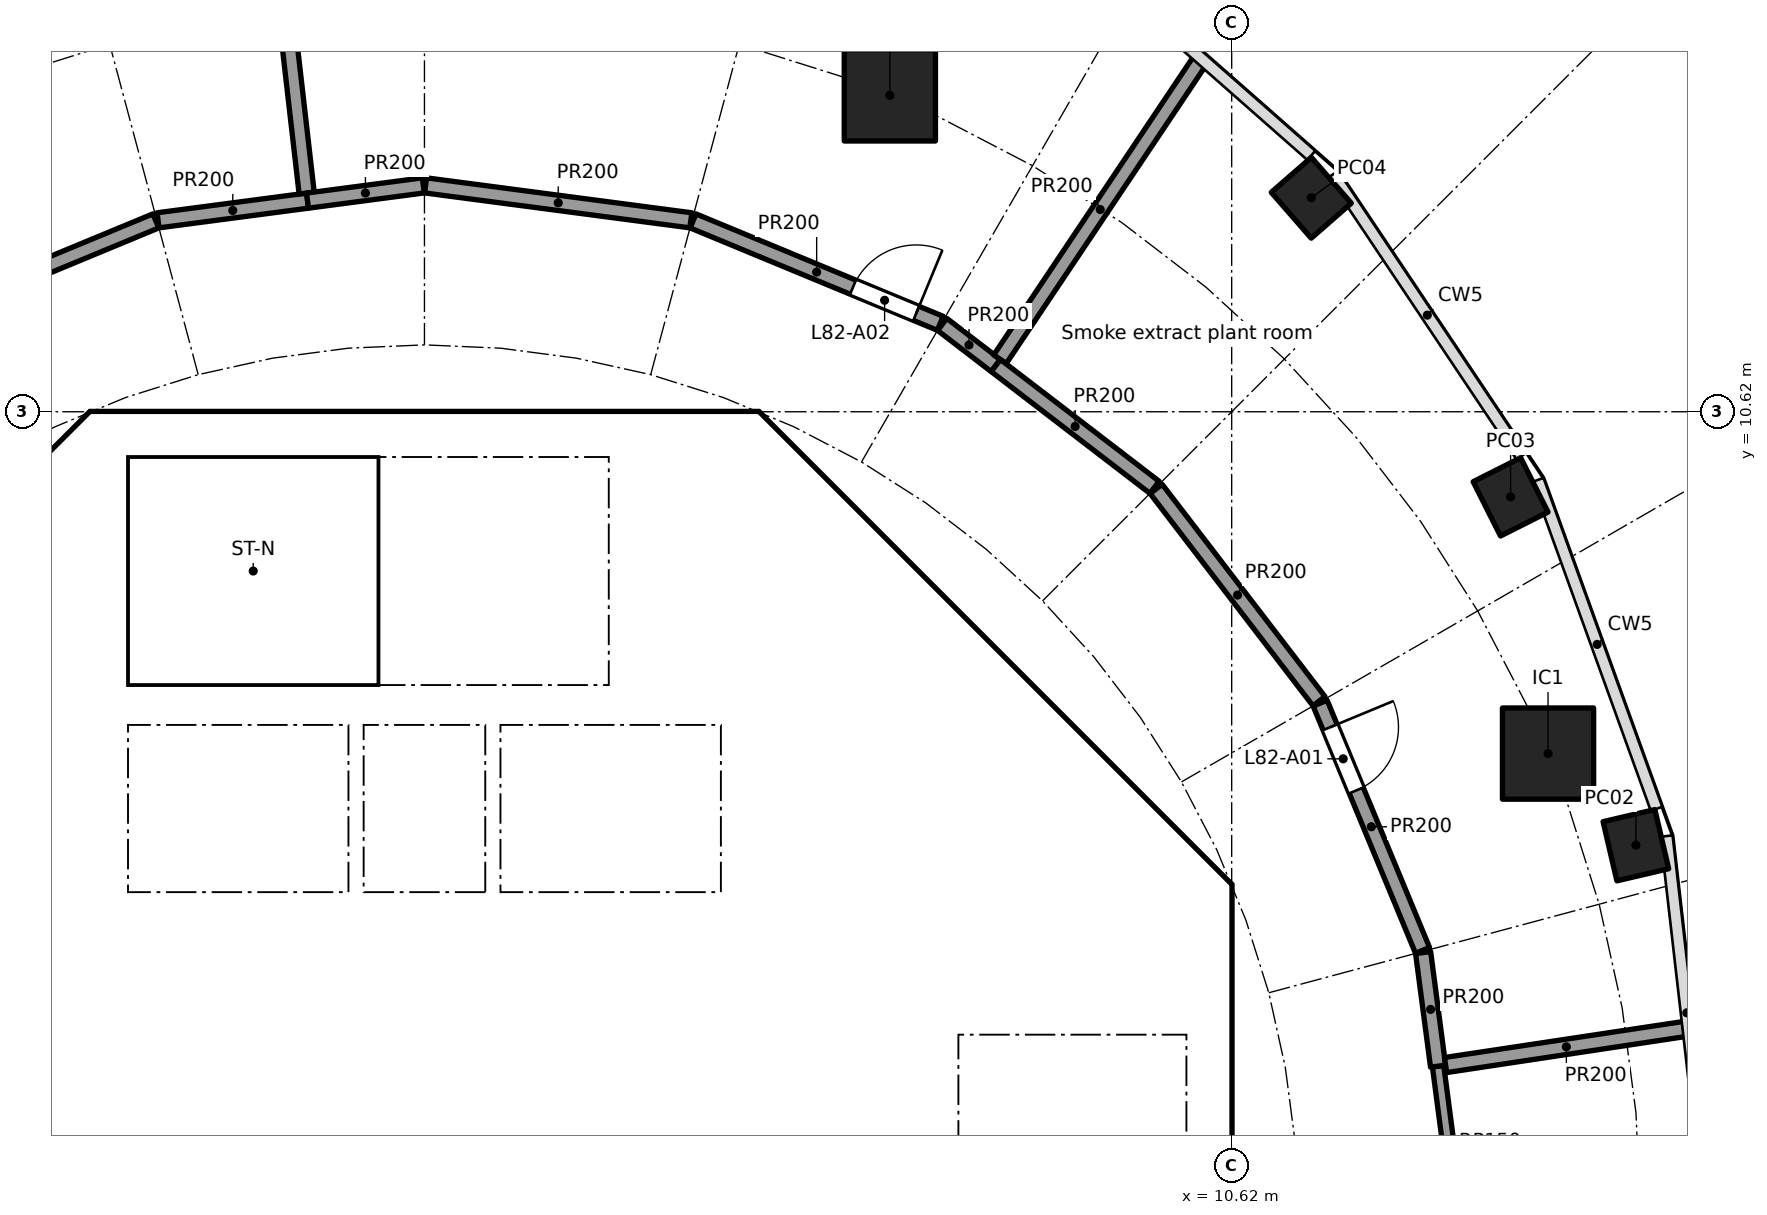
"""IFC4 building model, lengths in metres.
Left out: names, types, materials, properties, quantities, classifications, styles, units other than length and angle.
Written with IfcOpenShell. Run it as: python <this file> out.ifc"""

import sys

from ifc_helpers import new_model, si_unit, direction, frame, frame_2d, origin, origin_2d, place, context, subcontext, project, spatial, polyline, rectangle, hollow_rectangle, outline, extrude, element, fill, save


model = new_model("IFC4")
c1 = context("Model", 3, precision=1e-05, world=origin(), true_north=direction((0.0, 1.0)))
c2 = subcontext(c1, "Body", "Model", "MODEL_VIEW")
j1 = project(units=[si_unit("LENGTHUNIT", "METRE"), si_unit("PLANEANGLEUNIT", "RADIAN")], contexts=[c1])
p1 = place(None, origin())
s1 = spatial("IfcSite", under=j1, at=p1, CompositionType="ELEMENT")
p2 = place(p1, origin())
s2 = spatial("IfcBuilding", under=s1, at=p2, CompositionType="ELEMENT")
p3 = place(p2, frame((0.0, 0.0, 332.9)))
s3 = spatial("IfcBuildingStorey", under=s2, at=p3, CompositionType="ELEMENT", Elevation=332.9)
for number, where, z_axis, x_axis in (
    (1, (15.938, 4.917, 0.0), (0.0, 0.0, 1.0), (-0.227, 0.974, 0.0)),
    (2, (14.289, 9.5, 0.0), (0.0, 0.0, 1.0), (-0.45, 0.893, 0.0)),
    (3, (11.667, 13.435, 0.0), (0.0, 0.0, 1.0), (-0.657, 0.754, 0.0)),
):
    element("IfcColumn", number, at=place(p3, frame(where, z_axis=z_axis, x_axis=x_axis)), inside=s3, PredefinedType="COLUMN", context=c2, shape_type="SweptSolid", body=[
        extrude(hollow_rectangle(XDim=0.8, YDim=0.7, WallThickness=0.025, at=origin_2d()), origin(), (0.0, 0.0, 1.0), 4.0),
    ])
for number, where, z_axis, x_axis in (
    (4, (14.782, 6.123, 0.0), (0.0, 0.0, 1.0), (1.0, 0.0, 0.0)),
    (5, (6.123, 14.782, 0.0), (0.0, 0.0, 1.0), (1.0, 0.0, 0.0)),
):
    element("IfcColumn", number, at=place(p3, frame(where, z_axis=z_axis, x_axis=x_axis)), inside=s3, PredefinedType="COLUMN", context=c2, shape_type="SweptSolid", body=[
        extrude(rectangle(XDim=1.2, YDim=1.2, at=origin_2d()), origin(), (0.0, 0.0, 1.0), 4.0),
    ])
p4 = place(p3, frame((9.988, 4.613, 0.0), z_axis=(0.0, 0.0, 1.0), x_axis=(-0.707106781187, 0.707106781187, 0.0)))
e6 = element("IfcWall", 6, at=p4, inside=s3, PredefinedType="SHEAR", context=c2, shape_type="SweptSolid", body=[
    extrude(rectangle(XDim=7.602, YDim=0.6, at=frame_2d((3.801, 0.0))), origin(), (0.0, 0.0, 1.0), 3.7),
])
p5 = place(p4, frame((3.201, 0.0, 0.0)))
e7 = element("IfcOpeningElement", 7, at=p5, cuts=e6, PredefinedType="OPENING", context=c2, shape_type="SweptSolid", body=[
    extrude(rectangle(XDim=1.2, YDim=2.1, at=frame_2d((0.6, 1.05))), frame((0.0, 0.31, 0.0), z_axis=(0.0, -1.0, 0.0), x_axis=(1.0, 0.0, 0.0)), (0.0, 0.0, 1.0), 0.62),
])
p6 = place(p3, frame((-4.613, 9.988, 0.0), z_axis=(0.0, 0.0, 1.0), x_axis=(-0.707106781187, -0.707106781187, 0.0)))
e8 = element("IfcWall", 8, at=p6, inside=s3, PredefinedType="SHEAR", context=c2, shape_type="SweptSolid", body=[
    extrude(rectangle(XDim=7.602, YDim=0.6, at=frame_2d((3.801, 0.0))), origin(), (0.0, 0.0, 1.0), 3.7),
])
p7 = place(p6, frame((0.351, 0.0, 0.0)))
e9 = element("IfcOpeningElement", 9, at=p7, cuts=e8, PredefinedType="OPENING", context=c2, shape_type="SweptSolid", body=[
    extrude(rectangle(XDim=1.1, YDim=2.1, at=frame_2d((0.55, 1.05))), frame((0.0, 0.31, 0.0), z_axis=(0.0, -1.0, 0.0), x_axis=(1.0, 0.0, 0.0)), (0.0, 0.0, 1.0), 0.62),
])
p8 = place(p3, frame((4.0, 4.3, 0.0), z_axis=(0.0, 0.0, 1.0), x_axis=(0.0, 1.0, 0.0)))
e10 = element("IfcWall", 10, at=p8, inside=s3, PredefinedType="SOLIDWALL", context=c2, shape_type="SweptSolid", body=[
    extrude(rectangle(XDim=2.2, YDim=0.2, at=frame_2d((1.1, 0.0))), origin(), (0.0, 0.0, 1.0), 3.7),
])
p9 = place(p8, frame((0.55, 0.0, 0.0)))
e11 = element("IfcOpeningElement", 11, at=p9, cuts=e10, PredefinedType="OPENING", context=c2, shape_type="SweptSolid", body=[
    extrude(rectangle(XDim=1.1, YDim=2.1, at=frame_2d((0.55, 1.05))), frame((0.0, 0.11, 0.0), z_axis=(0.0, -1.0, 0.0), x_axis=(1.0, 0.0, 0.0)), (0.0, 0.0, 1.0), 0.22),
])
p10 = place(p3, frame((-4.0, 4.3, 0.0), z_axis=(0.0, 0.0, 1.0), x_axis=(0.0, 1.0, 0.0)))
e12 = element("IfcWall", 12, at=p10, inside=s3, PredefinedType="SOLIDWALL", context=c2, shape_type="SweptSolid", body=[
    extrude(rectangle(XDim=2.2, YDim=0.2, at=frame_2d((1.1, 0.0))), origin(), (0.0, 0.0, 1.0), 3.7),
])
p11 = place(p10, frame((0.55, 0.0, 0.0)))
e13 = element("IfcOpeningElement", 13, at=p11, cuts=e12, PredefinedType="OPENING", context=c2, shape_type="SweptSolid", body=[
    extrude(rectangle(XDim=1.1, YDim=2.1, at=frame_2d((0.55, 1.05))), frame((0.0, 0.11, 0.0), z_axis=(0.0, -1.0, 0.0), x_axis=(1.0, 0.0, 0.0)), (0.0, 0.0, 1.0), 0.22),
])
p12 = place(p3, frame((-6.7, 2.0, 0.0), z_axis=(0.0, 0.0, 1.0), x_axis=(1.0, 0.0, 0.0)))
e14 = element("IfcWall", 14, at=p12, inside=s3, PredefinedType="SOLIDWALL", context=c2, shape_type="SweptSolid", body=[
    extrude(rectangle(XDim=13.4, YDim=0.2, at=frame_2d((6.7, 0.0))), origin(), (0.0, 0.0, 1.0), 3.7),
])
p13 = place(p12, frame((2.95, 0.0, 0.0)))
e15 = element("IfcOpeningElement", 15, at=p13, cuts=e14, PredefinedType="OPENING", context=c2, shape_type="SweptSolid", body=[
    extrude(rectangle(XDim=0.9, YDim=2.1, at=frame_2d((0.45, 1.05))), frame((0.0, 0.11, 0.0), z_axis=(0.0, -1.0, 0.0), x_axis=(1.0, 0.0, 0.0)), (0.0, 0.0, 1.0), 0.22),
])
p14 = place(p12, frame((8.45, 0.0, 0.0)))
e16 = element("IfcOpeningElement", 16, at=p14, cuts=e14, PredefinedType="OPENING", context=c2, shape_type="SweptSolid", body=[
    extrude(rectangle(XDim=0.9, YDim=2.1, at=frame_2d((0.45, 1.05))), frame((0.0, 0.11, 0.0), z_axis=(0.0, -1.0, 0.0), x_axis=(1.0, 0.0, 0.0)), (0.0, 0.0, 1.0), 0.22),
])
p15 = place(p12, frame((11.75, 0.0, 0.0)))
e17 = element("IfcOpeningElement", 17, at=p15, cuts=e14, PredefinedType="OPENING", context=c2, shape_type="SweptSolid", body=[
    extrude(rectangle(XDim=0.9, YDim=2.1, at=frame_2d((0.45, 1.05))), frame((0.0, 0.11, 0.0), z_axis=(0.0, -1.0, 0.0), x_axis=(1.0, 0.0, 0.0)), (0.0, 0.0, 1.0), 0.22),
])
p16 = place(p3, frame((6.7, 4.0, 0.0), z_axis=(0.0, 0.0, 1.0), x_axis=(1.0, 0.0, 0.0)))
e18 = element("IfcWall", 18, at=p16, inside=s3, PredefinedType="SOLIDWALL", context=c2, shape_type="SweptSolid", body=[
    extrude(rectangle(XDim=3.325, YDim=0.2, at=frame_2d((1.662, 0.0))), origin(), (0.0, 0.0, 1.0), 3.7),
])
p17 = place(p16, frame((1.25, 0.0, 0.0)))
e19 = element("IfcOpeningElement", 19, at=p17, cuts=e18, PredefinedType="OPENING", context=c2, shape_type="SweptSolid", body=[
    extrude(rectangle(XDim=1.1, YDim=2.1, at=frame_2d((0.55, 1.05))), frame((0.0, 0.11, 0.0), z_axis=(0.0, -1.0, 0.0), x_axis=(1.0, 0.0, 0.0)), (0.0, 0.0, 1.0), 0.22),
])
p18 = place(p3, frame((4.0, 7.025, 0.0), z_axis=(0.0, 0.0, 1.0), x_axis=(0.0, 1.0, 0.0)))
e20 = element("IfcWall", 20, at=p18, inside=s3, PredefinedType="SOLIDWALL", context=c2, shape_type="SweptSolid", body=[
    extrude(rectangle(XDim=3.0, YDim=0.2, at=frame_2d((1.5, 0.0))), origin(), (0.0, 0.0, 1.0), 3.7),
])
p19 = place(p18, frame((0.925, 0.0, 0.0)))
e21 = element("IfcOpeningElement", 21, at=p19, cuts=e20, PredefinedType="OPENING", context=c2, shape_type="SweptSolid", body=[
    extrude(rectangle(XDim=1.1, YDim=2.1, at=frame_2d((0.55, 1.05))), frame((0.0, 0.11, 0.0), z_axis=(0.0, -1.0, 0.0), x_axis=(1.0, 0.0, 0.0)), (0.0, 0.0, 1.0), 0.22),
])
p20 = place(p3, origin())
e22 = element("IfcWall", 22, at=p20, inside=s3, PredefinedType="SHEAR", context=c2, shape_type="SweptSolid", body=[
    extrude(outline(polyline([(-4.152, 10.025), (-4.401, 9.776), (-4.825, 10.2), (-4.401, 10.625), (4.401, 10.625), (4.825, 10.2), (4.401, 9.776), (4.152, 10.025), (-4.152, 10.025)])), origin(), (0.0, 0.0, 1.0), 3.7),
])
p21 = place(p3, origin())
e23 = element("IfcWall", 23, at=p21, inside=s3, PredefinedType="SHEAR", context=c2, shape_type="SweptSolid", body=[
    extrude(outline(polyline([(9.776, -4.401), (10.025, -4.152), (10.025, -3.801), (10.025, 4.152), (9.776, 4.401), (10.2, 4.825), (10.625, 4.401), (10.625, -4.401), (10.2, -4.825), (9.776, -4.401)])), origin(), (0.0, 0.0, 1.0), 3.7),
])
for number, where, z_axis, x_axis in (
    (24, (-0.9, 4.3, 0.0), (0.0, 0.0, 1.0), (0.0, 1.0, 0.0)),
    (25, (0.9, 4.3, 0.0), (0.0, 0.0, 1.0), (0.0, 1.0, 0.0)),
):
    element("IfcWall", number, at=place(p3, frame(where, z_axis=z_axis, x_axis=x_axis)), inside=s3, PredefinedType="SOLIDWALL", context=c2, shape_type="SweptSolid", body=[
        extrude(rectangle(XDim=2.2, YDim=0.2, at=frame_2d((1.1, 0.0))), origin(), (0.0, 0.0, 1.0), 3.7),
    ])
p22 = place(p3, origin())
e26 = element("IfcWall", 26, at=p22, inside=s3, PredefinedType="SOLIDWALL", context=c2, shape_type="SweptSolid", body=[
    extrude(outline(polyline([(-6.7, 4.3), (6.7, 4.3), (6.7, 2.1), (6.5, 2.1), (6.5, 4.1), (4.5, 4.1), (4.5, 2.1), (4.3, 2.1), (4.3, 4.1), (0.1, 4.1), (0.1, 2.1), (-0.1, 2.1), (-0.1, 4.1), (-6.5, 4.1), (-6.5, 2.1), (-6.7, 2.1), (-6.7, 4.3)])), origin(), (0.0, 0.0, 1.0), 3.7),
])
p23 = place(p3, origin())
e27 = element("IfcWall", 27, at=p23, inside=s3, PredefinedType="SOLIDWALL", context=c2, shape_type="SweptSolid", body=[
    extrude(outline(polyline([(-3.9, 7.025), (-4.1, 7.025), (-4.1, 10.025), (-3.9, 10.025), (-3.9, 7.025)])), origin(), (0.0, 0.0, 1.0), 3.7),
])
p24 = place(p3, origin())
e28 = element("IfcWall", 28, at=p24, inside=s3, PredefinedType="SOLIDWALL", context=c2, shape_type="SweptSolid", body=[
    extrude(outline(polyline([(4.1, 6.5), (-4.1, 6.5), (-4.1, 7.025), (4.1, 7.025), (4.1, 6.5)])), origin(), (0.0, 0.0, 1.0), 3.7),
])
p25 = place(p3, origin())
e29 = element("IfcWall", 29, at=p25, inside=s3, PredefinedType="SOLIDWALL", context=c2, shape_type="SweptSolid", body=[
    extrude(outline(polyline([(7.025, -3.9), (6.7, -3.9), (6.7, 3.9), (7.025, 3.9), (7.025, -3.9)])), origin(), (0.0, 0.0, 1.0), 3.7),
])
p26 = place(p3, frame((13.335, 2.01, 0.0), z_axis=(0.0, 0.0, 1.0), x_axis=(0.130545357325, -0.991442338051, 0.0)))
e30 = element("IfcWall", 30, at=p26, inside=s3, PredefinedType="PARTITIONING", context=c2, shape_type="SweptSolid", body=[
    extrude(rectangle(XDim=2.016, YDim=0.15, at=frame_2d((1.008, 0.0))), origin(), (0.0, 0.0, 1.0), 3.7),
])
p27 = place(p3, frame((-6.786, 11.784, 0.0), z_axis=(0.0, 0.0, 1.0), x_axis=(0.92386297064, 0.382723413813, 0.0)))
e31 = element("IfcWall", 31, at=p27, inside=s3, PredefinedType="PARTITIONING", context=c2, shape_type="SweptSolid", body=[
    extrude(rectangle(XDim=3.52, YDim=0.2, at=frame_2d((1.76, 0.0))), origin(), (0.0, 0.0, 1.0), 3.7),
])
p28 = place(p3, frame((-3.505, 13.139, 0.0), z_axis=(0.0, 0.0, 1.0), x_axis=(0.991454295543, 0.130454512571, 0.0)))
e32 = element("IfcWall", 32, at=p28, inside=s3, PredefinedType="PARTITIONING", context=c2, shape_type="SweptSolid", body=[
    extrude(rectangle(XDim=1.984, YDim=0.2, at=frame_2d((0.992, 0.0))), origin(), (0.0, 0.0, 1.0), 3.7),
])
p29 = place(p3, frame((-1.55, 13.497, 0.0), z_axis=(0.0, 0.0, 1.0), x_axis=(-0.114057329834, 0.993474169524, 0.0)))
e33 = element("IfcWall", 33, at=p29, inside=s3, PredefinedType="PARTITIONING", context=c2, shape_type="SweptSolid", body=[
    extrude(rectangle(XDim=5.608, YDim=0.2, at=frame_2d((2.804, 0.0))), origin(), (0.0, 0.0, 1.0), 3.7),
])
p30 = place(p3, frame((-1.538, 13.397, 0.0), z_axis=(0.0, 0.0, 1.0), x_axis=(0.991449967232, 0.13048740351, 0.0)))
e34 = element("IfcWall", 34, at=p30, inside=s3, PredefinedType="PARTITIONING", context=c2, shape_type="SweptSolid", body=[
    extrude(rectangle(XDim=1.536, YDim=0.2, at=frame_2d((0.768, 0.0))), origin(), (0.0, 0.0, 1.0), 3.7),
])
p31 = place(p3, frame((0.015, 13.598, 0.0), z_axis=(0.0, 0.0, 1.0), x_axis=(0.991452406768, -0.130468866457, 0.0)))
e35 = element("IfcWall", 35, at=p31, inside=s3, PredefinedType="PARTITIONING", context=c2, shape_type="SweptSolid", body=[
    extrude(rectangle(XDim=3.52, YDim=0.2, at=frame_2d((1.76, 0.0))), origin(), (0.0, 0.0, 1.0), 3.7),
])
p32 = place(p3, frame((3.534, 13.131, 0.0), z_axis=(0.0, 0.0, 1.0), x_axis=(0.92386297064, -0.382723413813, 0.0)))
e36 = element("IfcWall", 36, at=p32, inside=s3, PredefinedType="PARTITIONING", context=c2, shape_type="SweptSolid", body=[
    extrude(rectangle(XDim=3.52, YDim=0.2, at=frame_2d((1.76, 0.0))), origin(), (0.0, 0.0, 1.0), 3.7),
])
p33 = place(p32, frame((2.278, 0.0, 0.0)))
e37 = element("IfcOpeningElement", 37, at=p33, cuts=e36, PredefinedType="OPENING", context=c2, shape_type="SweptSolid", body=[
    extrude(rectangle(XDim=0.9, YDim=2.1, at=frame_2d((0.45, 1.05))), frame((0.0, 0.11, 0.0), z_axis=(0.0, -1.0, 0.0), x_axis=(1.0, 0.0, 0.0)), (0.0, 0.0, 1.0), 0.22),
])
p34 = place(p3, frame((6.812, 11.769, 0.0), z_axis=(0.0, 0.0, 1.0), x_axis=(0.793420478802, -0.608673922407, 0.0)))
e38 = element("IfcWall", 38, at=p34, inside=s3, PredefinedType="PARTITIONING", context=c2, shape_type="SweptSolid", body=[
    extrude(rectangle(XDim=0.888, YDim=0.2, at=frame_2d((0.444, 0.0))), origin(), (0.0, 0.0, 1.0), 3.7),
])
p35 = place(p3, frame((7.517, 11.228, 0.0), z_axis=(0.0, 0.0, 1.0), x_axis=(0.793395797287, -0.608706093979, 0.0)))
e39 = element("IfcWall", 39, at=p35, inside=s3, PredefinedType="PARTITIONING", context=c2, shape_type="SweptSolid", body=[
    extrude(rectangle(XDim=2.632, YDim=0.2, at=frame_2d((1.316, 0.0))), origin(), (0.0, 0.0, 1.0), 3.7),
])
p36 = place(p3, frame((7.572, 11.311, 0.0), z_axis=(0.0, 0.0, 1.0), x_axis=(0.55629198168, 0.830986901893, 0.0)))
e40 = element("IfcWall", 40, at=p36, inside=s3, PredefinedType="PARTITIONING", context=c2, shape_type="SweptSolid", body=[
    extrude(rectangle(XDim=4.74, YDim=0.2, at=frame_2d((2.37, 0.0))), origin(), (0.0, 0.0, 1.0), 3.7),
])
p37 = place(p3, frame((9.626, 9.605, 0.0), z_axis=(0.0, 0.0, 1.0), x_axis=(0.608697977542, -0.793402024283, 0.0)))
e41 = element("IfcWall", 41, at=p37, inside=s3, PredefinedType="PARTITIONING", context=c2, shape_type="SweptSolid", body=[
    extrude(rectangle(XDim=3.52, YDim=0.2, at=frame_2d((1.76, 0.0))), origin(), (0.0, 0.0, 1.0), 3.7),
])
p38 = place(p3, frame((11.784, 6.786, 0.0), z_axis=(0.0, 0.0, 1.0), x_axis=(0.382723413813, -0.92386297064, 0.0)))
e42 = element("IfcWall", 42, at=p38, inside=s3, PredefinedType="PARTITIONING", context=c2, shape_type="SweptSolid", body=[
    extrude(rectangle(XDim=3.52, YDim=0.2, at=frame_2d((1.76, 0.0))), origin(), (0.0, 0.0, 1.0), 3.7),
])
p39 = place(p38, frame((0.342, 0.0, 0.0)))
e43 = element("IfcOpeningElement", 43, at=p39, cuts=e42, PredefinedType="OPENING", context=c2, shape_type="SweptSolid", body=[
    extrude(rectangle(XDim=0.9, YDim=2.1, at=frame_2d((0.45, 1.05))), frame((0.0, 0.11, 0.0), z_axis=(0.0, -1.0, 0.0), x_axis=(1.0, 0.0, 0.0)), (0.0, 0.0, 1.0), 0.22),
])
p40 = place(p3, frame((13.139, 3.505, 0.0), z_axis=(0.0, 0.0, 1.0), x_axis=(0.130391662061, -0.99146256332, 0.0)))
e44 = element("IfcWall", 44, at=p40, inside=s3, PredefinedType="PARTITIONING", context=c2, shape_type="SweptSolid", body=[
    extrude(rectangle(XDim=1.507, YDim=0.2, at=frame_2d((0.754, 0.0))), origin(), (0.0, 0.0, 1.0), 3.7),
])
p41 = place(p3, frame((13.434, 2.025, 0.0), z_axis=(0.0, 0.0, 1.0), x_axis=(0.988817905908, 0.149127961685, 0.0)))
e45 = element("IfcWall", 45, at=p41, inside=s3, PredefinedType="PARTITIONING", context=c2, shape_type="SweptSolid", body=[
    extrude(rectangle(XDim=3.214, YDim=0.2, at=frame_2d((1.607, 0.0))), origin(), (0.0, 0.0, 1.0), 3.7),
])
p42 = place(p9, origin())
e46 = element("IfcDoor", 46, at=p42, inside=s3, OperationType="DOUBLE_DOOR_SLIDING", PredefinedType="DOOR", context=c2, shape_type="SweptSolid", body=[
    extrude(rectangle(XDim=1.1, YDim=2.1, at=frame_2d((0.55, 1.05))), frame((0.0, 0.025, 0.0), z_axis=(0.0, -1.0, 0.0), x_axis=(1.0, 0.0, 0.0)), (0.0, 0.0, 1.0), 0.05),
])
fill(e11, e46)
p43 = place(p11, origin())
e47 = element("IfcDoor", 47, at=p43, inside=s3, OperationType="DOUBLE_DOOR_SLIDING", PredefinedType="DOOR", context=c2, shape_type="SweptSolid", body=[
    extrude(rectangle(XDim=1.1, YDim=2.1, at=frame_2d((0.55, 1.05))), frame((0.0, 0.025, 0.0), z_axis=(0.0, -1.0, 0.0), x_axis=(1.0, 0.0, 0.0)), (0.0, 0.0, 1.0), 0.05),
])
fill(e13, e47)
p44 = place(p17, frame((1.1, 0.0, 0.0), x_axis=(-1.0, 0.0, 0.0)))
e48 = element("IfcDoor", 48, at=p44, inside=s3, OperationType="SINGLE_SWING_RIGHT", PredefinedType="DOOR", context=c2, shape_type="SweptSolid", body=[
    extrude(rectangle(XDim=1.1, YDim=2.1, at=frame_2d((0.55, 1.05))), frame((0.0, 0.025, 0.0), z_axis=(0.0, -1.0, 0.0), x_axis=(1.0, 0.0, 0.0)), (0.0, 0.0, 1.0), 0.05),
])
fill(e19, e48)
p45 = place(p19, origin())
e49 = element("IfcDoor", 49, at=p45, inside=s3, OperationType="SINGLE_SWING_LEFT", PredefinedType="DOOR", context=c2, shape_type="SweptSolid", body=[
    extrude(rectangle(XDim=1.1, YDim=2.1, at=frame_2d((0.55, 1.05))), frame((0.0, 0.025, 0.0), z_axis=(0.0, -1.0, 0.0), x_axis=(1.0, 0.0, 0.0)), (0.0, 0.0, 1.0), 0.05),
])
fill(e21, e49)
p46 = place(p13, origin())
e50 = element("IfcDoor", 50, at=p46, inside=s3, OperationType="SINGLE_SWING_LEFT", PredefinedType="DOOR", context=c2, shape_type="SweptSolid", body=[
    extrude(rectangle(XDim=0.9, YDim=2.1, at=frame_2d((0.45, 1.05))), frame((0.0, 0.025, 0.0), z_axis=(0.0, -1.0, 0.0), x_axis=(1.0, 0.0, 0.0)), (0.0, 0.0, 1.0), 0.05),
])
fill(e15, e50)
p47 = place(p14, origin())
e51 = element("IfcDoor", 51, at=p47, inside=s3, OperationType="SINGLE_SWING_LEFT", PredefinedType="DOOR", context=c2, shape_type="SweptSolid", body=[
    extrude(rectangle(XDim=0.9, YDim=2.1, at=frame_2d((0.45, 1.05))), frame((0.0, 0.025, 0.0), z_axis=(0.0, -1.0, 0.0), x_axis=(1.0, 0.0, 0.0)), (0.0, 0.0, 1.0), 0.05),
])
fill(e16, e51)
p48 = place(p15, origin())
e52 = element("IfcDoor", 52, at=p48, inside=s3, OperationType="SINGLE_SWING_RIGHT", PredefinedType="DOOR", context=c2, shape_type="SweptSolid", body=[
    extrude(rectangle(XDim=0.9, YDim=2.1, at=frame_2d((0.45, 1.05))), frame((0.0, 0.025, 0.0), z_axis=(0.0, -1.0, 0.0), x_axis=(1.0, 0.0, 0.0)), (0.0, 0.0, 1.0), 0.05),
])
fill(e17, e52)
p49 = place(p5, origin())
e53 = element("IfcDoor", 53, at=p49, inside=s3, OperationType="SINGLE_SWING_RIGHT", PredefinedType="DOOR", context=c2, shape_type="SweptSolid", body=[
    extrude(rectangle(XDim=1.2, YDim=2.1, at=frame_2d((0.6, 1.05))), frame((0.0, 0.025, 0.0), z_axis=(0.0, -1.0, 0.0), x_axis=(1.0, 0.0, 0.0)), (0.0, 0.0, 1.0), 0.05),
])
fill(e7, e53)
p50 = place(p7, origin())
e54 = element("IfcDoor", 54, at=p50, inside=s3, OperationType="SINGLE_SWING_RIGHT", PredefinedType="DOOR", context=c2, shape_type="SweptSolid", body=[
    extrude(rectangle(XDim=1.1, YDim=2.1, at=frame_2d((0.55, 1.05))), frame((0.0, 0.025, 0.0), z_axis=(0.0, -1.0, 0.0), x_axis=(1.0, 0.0, 0.0)), (0.0, 0.0, 1.0), 0.05),
])
fill(e9, e54)
p51 = place(p39, origin())
e55 = element("IfcDoor", 55, at=p51, inside=s3, OperationType="SINGLE_SWING_LEFT", PredefinedType="DOOR", context=c2, shape_type="SweptSolid", body=[
    extrude(rectangle(XDim=0.9, YDim=2.1, at=frame_2d((0.45, 1.05))), frame((0.0, 0.025, 0.0), z_axis=(0.0, -1.0, 0.0), x_axis=(1.0, 0.0, 0.0)), (0.0, 0.0, 1.0), 0.05),
])
fill(e43, e55)
p52 = place(p33, origin())
e56 = element("IfcDoor", 56, at=p52, inside=s3, OperationType="SINGLE_SWING_RIGHT", PredefinedType="DOOR", context=c2, shape_type="SweptSolid", body=[
    extrude(rectangle(XDim=0.9, YDim=2.1, at=frame_2d((0.45, 1.05))), frame((0.0, 0.025, 0.0), z_axis=(0.0, -1.0, 0.0), x_axis=(1.0, 0.0, 0.0)), (0.0, 0.0, 1.0), 0.05),
])
fill(e37, e56)
save(model, sys.argv[1])
